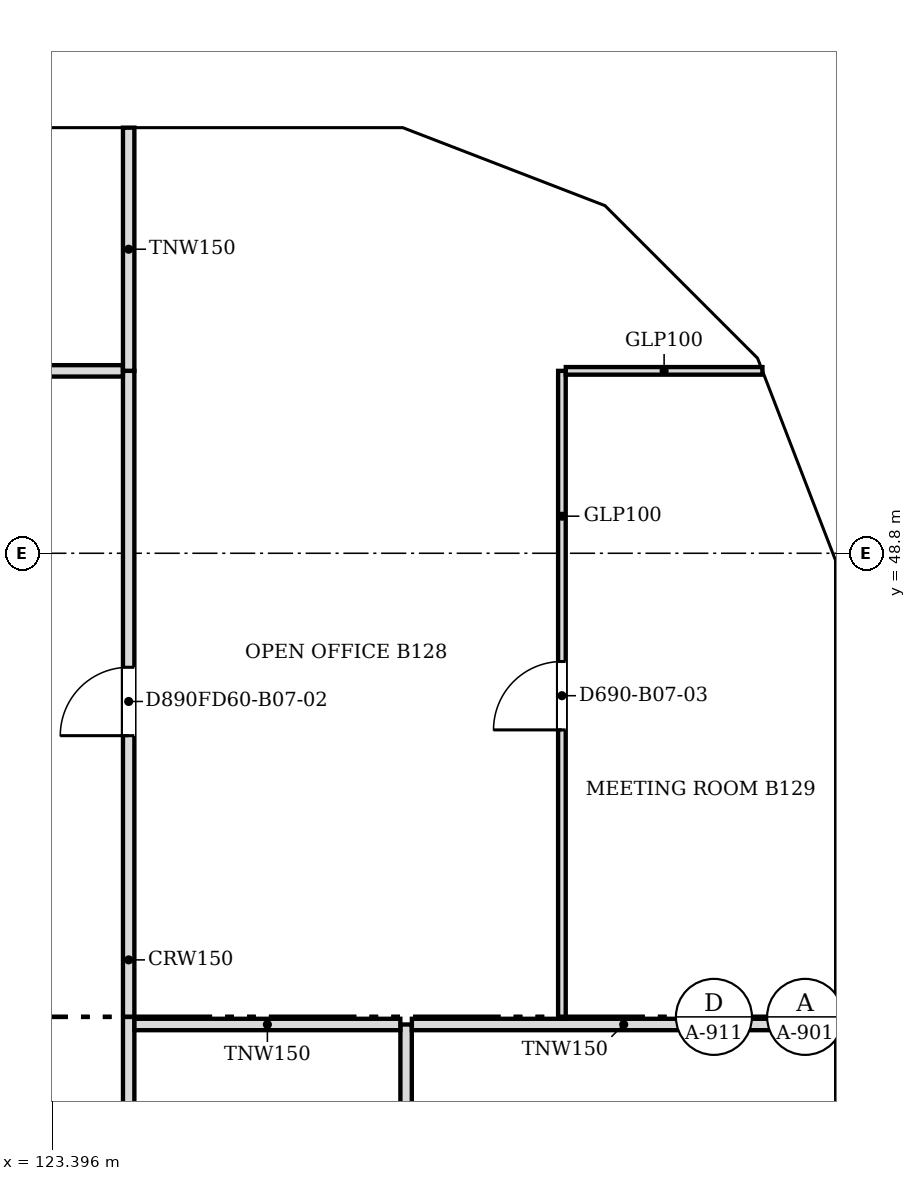
"""IFC4 building model, lengths in metres.
Left out: names, types, materials, properties, quantities, classifications, styles, units other than length and angle.
Written with IfcOpenShell. Run it as: python <this file> out.ifc"""

import sys

from ifc_helpers import new_model, si_unit, direction, frame, frame_2d, origin, place, context, subcontext, project, spatial, polyline, rectangle, outline, extrude, faceted_brep, source, transform, mapped, element, fill, save


model = new_model("IFC4")
c1 = context("Model", 3, precision=1e-05, world=origin(), true_north=direction((0.0, 1.0)))
c2 = subcontext(c1, "Body", "Model", "MODEL_VIEW")
j1 = project(units=[si_unit("LENGTHUNIT", "METRE"), si_unit("PLANEANGLEUNIT", "RADIAN")], contexts=[c1])
p1 = place(None, origin())
s1 = spatial("IfcSite", under=j1, at=p1, CompositionType="ELEMENT")
p2 = place(p1, origin())
s2 = spatial("IfcBuilding", under=s1, at=p2, CompositionType="ELEMENT")
p3 = place(p2, frame((0.0, 0.0, 72.4)))
s3 = spatial("IfcBuildingStorey", under=s2, at=p3, CompositionType="ELEMENT", Elevation=72.4)
m1 = source(origin(), c2, "Body", "SweptSolid", [
    extrude(outline(polyline([(3.05, 0.0), (6.1, 3.8), (3.05, 7.6), (0.0, 3.8), (3.05, 0.0)])), frame((0.0, 0.25, 0.0), z_axis=(0.0, -1.0, 0.0), x_axis=(1.0, 0.0, 0.0)), (0.0, 0.0, 1.0), 0.5),
])
p4 = place(p3, frame((133.95, 39.65, -3.8), z_axis=(0.0, 0.0, 1.0), x_axis=(0.0, 1.0, 0.0)))
e1 = element("IfcWall", 1, at=p4, inside=s3, PredefinedType="SOLIDWALL", context=c2, shape_type="MappedRepresentation", body=[
    mapped(m1, transform((0.0, 0.0, 0.0), scale=1.0)),
])
m2 = source(origin(), c2, "Body", "SweptSolid", [
    extrude(outline(polyline([(3.05, 0.399), (5.78, 3.8), (3.05, 7.2), (0.321, 3.8), (3.05, 0.399)])), frame((0.0, 0.26, 0.0), z_axis=(0.0, -1.0, 0.0), x_axis=(1.0, 0.0, 0.0)), (0.0, 0.0, 1.0), 0.52),
])
p5 = place(p4, origin())
e2 = element("IfcOpeningElement", 2, at=p5, cuts=e1, PredefinedType="OPENING", context=c2, shape_type="MappedRepresentation", body=[
    mapped(m2, transform((0.0, 0.0, 0.0), scale=1.0)),
])
m3 = source(origin(), c2, "Body", "Brep", [
    faceted_brep([(3.003, -0.25, 0.0), (3.05, -0.25, 0.06), (3.05, -0.25, 7.54), (3.003, -0.25, 7.6), (0.0, -0.25, 3.8), (0.0, 0.25, 3.8), (2.957, 0.25, 7.541), (2.957, 0.25, 0.059), (3.003, 0.0, 0.0), (3.003, 0.0, 7.6)], [[[0, 1, 2, 3, 4]], [[5, 6, 7]], [[1, 0, 8]], [[9, 3, 2]], [[6, 5, 4, 3, 9]], [[5, 7, 8, 0, 4]], [[1, 8, 7, 6, 9, 2]]]),
])
p6 = place(p3, frame((133.95, 45.75, -3.8), z_axis=(0.0, 0.0, 1.0), x_axis=(0.0, 1.0, 0.0)))
e3 = element("IfcWall", 3, at=p6, inside=s3, PredefinedType="SOLIDWALL", context=c2, shape_type="MappedRepresentation", body=[
    mapped(m3, transform((0.0, 0.0, 0.0), scale=1.0)),
])
m4 = source(origin(), c2, "Body", "SweptSolid", [
    extrude(outline(polyline([(2.803, 6.944), (0.319, 3.8), (2.803, 0.656), (2.803, 6.944)])), frame((0.0, 0.26, 0.0), z_axis=(0.0, -1.0, 0.0), x_axis=(1.0, 0.0, 0.0)), (0.0, 0.0, 1.0), 0.52),
])
p7 = place(p6, origin())
e4 = element("IfcOpeningElement", 4, at=p7, cuts=e3, PredefinedType="OPENING", context=c2, shape_type="MappedRepresentation", body=[
    mapped(m4, transform((0.0, 0.0, 0.0), scale=1.0)),
])
m5 = source(origin(), c2, "Body", "Brep", [
    faceted_brep([(0.047, -0.25, 0.0), (2.997, -0.25, 3.8), (0.047, -0.25, 7.6), (0.0, -0.25, 7.541), (0.0, -0.25, 0.059), (0.093, 0.25, 7.54), (2.944, 0.25, 3.868), (2.944, 0.25, 3.732), (0.093, 0.25, 0.06), (2.997, 0.0, 3.8), (0.047, 0.0, 0.0), (0.047, 0.0, 7.6)], [[[0, 1, 2, 3, 4]], [[5, 6, 7, 8]], [[8, 7, 9, 1, 0, 10]], [[6, 5, 11, 2, 1, 9]], [[3, 2, 11]], [[10, 0, 4]], [[8, 10, 4, 3, 11, 5]], [[9, 7, 6]]]),
])
p8 = place(p3, frame((133.967, 48.71, -3.8), z_axis=(0.0, 0.0, 1.0), x_axis=(-0.359901446078, 0.932990326376, 0.0)))
e5 = element("IfcWall", 5, at=p8, inside=s3, PredefinedType="SOLIDWALL", context=c2, shape_type="MappedRepresentation", body=[
    mapped(m5, transform((0.0, 0.0, 0.0), scale=1.0)),
])
m6 = source(origin(), c2, "Body", "SweptSolid", [
    extrude(outline(polyline([(0.247, 0.665), (2.681, 3.8), (0.247, 6.935), (0.247, 0.665)])), frame((0.0, 0.26, 0.0), z_axis=(0.0, -1.0, 0.0), x_axis=(1.0, 0.0, 0.0)), (0.0, 0.0, 1.0), 0.52),
])
p9 = place(p8, origin())
e6 = element("IfcOpeningElement", 6, at=p9, cuts=e5, PredefinedType="OPENING", context=c2, shape_type="MappedRepresentation", body=[
    mapped(m6, transform((0.0, 0.0, 0.0), scale=1.0)),
])
m7 = source(origin(), c2, "Body", "Brep", [
    faceted_brep([(2.944, -0.25, 0.0), (2.997, -0.25, 0.068), (2.997, -0.25, 7.532), (2.944, -0.25, 7.6), (0.0, -0.25, 3.8), (0.053, 0.25, 3.868), (2.891, 0.25, 7.532), (2.891, 0.25, 0.068), (0.053, 0.25, 3.731), (2.944, 0.0, 0.0), (2.944, 0.0, 7.6), (0.0, 0.0, 3.8)], [[[0, 1, 2, 3, 4]], [[5, 6, 7, 8]], [[1, 0, 9]], [[10, 3, 2]], [[6, 5, 11, 4, 3, 10]], [[8, 7, 9, 0, 4, 11]], [[8, 11, 5]], [[1, 9, 7, 6, 10, 2]]]),
])
p10 = place(p3, frame((132.888, 51.506, -3.8), z_axis=(0.0, 0.0, 1.0), x_axis=(-0.707147509625, 0.707066050402, 0.0)))
e7 = element("IfcWall", 7, at=p10, inside=s3, PredefinedType="SOLIDWALL", context=c2, shape_type="MappedRepresentation", body=[
    mapped(m7, transform((0.0, 0.0, 0.0), scale=1.0)),
])
m8 = source(origin(), c2, "Body", "SweptSolid", [
    extrude(outline(polyline([(2.744, 6.934), (0.316, 3.8), (2.744, 0.666), (2.744, 6.934)])), frame((0.0, 0.26, 0.0), z_axis=(0.0, -1.0, 0.0), x_axis=(1.0, 0.0, 0.0)), (0.0, 0.0, 1.0), 0.52),
])
p11 = place(p10, origin())
e8 = element("IfcOpeningElement", 8, at=p11, cuts=e7, PredefinedType="OPENING", context=c2, shape_type="MappedRepresentation", body=[
    mapped(m8, transform((0.0, 0.0, 0.0), scale=1.0)),
])
m9 = source(origin(), c2, "Body", "Brep", [
    faceted_brep([(0.053, -0.25, 0.0), (3.003, -0.25, 3.8), (0.053, -0.25, 7.6), (0.0, -0.25, 7.531), (0.0, -0.25, 0.068), (0.106, 0.25, 7.532), (2.957, 0.25, 3.86), (2.957, 0.25, 3.74), (0.106, 0.25, 0.068), (3.003, 0.0, 3.8), (0.053, 0.0, 0.0), (0.053, 0.0, 7.6)], [[[0, 1, 2, 3, 4]], [[5, 6, 7, 8]], [[8, 7, 9, 1, 0, 10]], [[6, 5, 11, 2, 1, 9]], [[3, 2, 11]], [[10, 0, 4]], [[8, 10, 4, 3, 11, 5]], [[9, 7, 6]]]),
])
p12 = place(p3, frame((130.856, 53.569, -3.8), z_axis=(0.0, 0.0, 1.0), x_axis=(-0.933007896601, 0.359855894603, 0.0)))
e9 = element("IfcWall", 9, at=p12, inside=s3, PredefinedType="SOLIDWALL", context=c2, shape_type="MappedRepresentation", body=[
    mapped(m9, transform((0.0, 0.0, 0.0), scale=1.0)),
])
m10 = source(origin(), c2, "Body", "SweptSolid", [
    extrude(outline(polyline([(0.253, 0.665), (2.687, 3.8), (0.253, 6.935), (0.253, 0.665)])), frame((0.0, 0.26, 0.0), z_axis=(0.0, -1.0, 0.0), x_axis=(1.0, 0.0, 0.0)), (0.0, 0.0, 1.0), 0.52),
])
p13 = place(p12, origin())
e10 = element("IfcOpeningElement", 10, at=p13, cuts=e9, PredefinedType="OPENING", context=c2, shape_type="MappedRepresentation", body=[
    mapped(m10, transform((0.0, 0.0, 0.0), scale=1.0)),
])
m11 = source(origin(), c2, "Body", "Brep", [
    faceted_brep([(3.003, -0.25, 0.0), (6.053, -0.25, 3.8), (3.003, -0.25, 7.6), (0.0, -0.25, 3.8), (0.047, 0.25, 3.859), (3.003, 0.25, 7.6), (6.053, 0.25, 3.8), (3.003, 0.25, 0.0), (0.047, 0.25, 3.741), (0.0, 0.0, 3.8)], [[[0, 1, 2, 3]], [[4, 5, 6, 7, 8]], [[7, 6, 1, 0]], [[6, 5, 2, 1]], [[5, 4, 9, 3, 2]], [[8, 7, 0, 3, 9]], [[8, 9, 4]]]),
])
p14 = place(p3, frame((128.053, 54.65, -3.8), z_axis=(0.0, 0.0, 1.0), x_axis=(-1.0, 0.0, 0.0)))
e11 = element("IfcWall", 11, at=p14, inside=s3, PredefinedType="SOLIDWALL", context=c2, shape_type="MappedRepresentation", body=[
    mapped(m11, transform((0.0, 0.0, 0.0), scale=1.0)),
])
m12 = source(origin(), c2, "Body", "SweptSolid", [
    extrude(outline(polyline([(3.005, 0.401), (5.733, 3.8), (3.005, 7.199), (0.319, 3.8), (3.005, 0.401)])), frame((0.0, 0.26, 0.0), z_axis=(0.0, -1.0, 0.0), x_axis=(1.0, 0.0, 0.0)), (0.0, 0.0, 1.0), 0.52),
])
p15 = place(p14, origin())
e12 = element("IfcOpeningElement", 12, at=p15, cuts=e11, PredefinedType="OPENING", context=c2, shape_type="MappedRepresentation", body=[
    mapped(m12, transform((0.0, 0.0, 0.0), scale=1.0)),
])
p16 = place(p2, frame((0.0, 0.0, 76.2)))
s4 = spatial("IfcBuildingStorey", under=s2, at=p16, CompositionType="ELEMENT", Elevation=76.2)
m13 = source(origin(), c2, "Body", "Brep", [
    faceted_brep([(3.05, -0.25, 0.0), (6.1, -0.25, 3.8), (6.1, -0.25, 3.8), (3.05, -0.25, 7.6), (0.0, -0.25, 3.8), (0.0, 0.25, 3.8), (3.05, 0.25, 7.6), (6.1, 0.25, 3.8), (6.1, 0.25, 3.8), (3.05, 0.25, 0.0)], [[[0, 1, 2, 3, 4]], [[5, 6, 7, 8, 9]], [[9, 8, 1, 0]], [[7, 6, 3, 2]], [[6, 5, 4, 3]], [[5, 9, 0, 4]], [[1, 8, 7, 2]]]),
])
p17 = place(p16, frame((133.95, 36.6, -3.8), z_axis=(0.0, 0.0, 1.0), x_axis=(0.0, 1.0, 0.0)))
e13 = element("IfcWall", 13, at=p17, inside=s4, PredefinedType="SOLIDWALL", context=c2, shape_type="MappedRepresentation", body=[
    mapped(m13, transform((0.0, 0.0, 0.0), scale=1.0)),
])
m14 = source(origin(), c2, "Body", "SweptSolid", [
    extrude(outline(polyline([(3.05, 0.399), (5.78, 3.8), (3.05, 7.201), (0.321, 3.8), (3.05, 0.399)])), frame((0.0, 0.26, 0.0), z_axis=(0.0, -1.0, 0.0), x_axis=(1.0, 0.0, 0.0)), (0.0, 0.0, 1.0), 0.52),
])
p18 = place(p17, origin())
e14 = element("IfcOpeningElement", 14, at=p18, cuts=e13, PredefinedType="OPENING", context=c2, shape_type="MappedRepresentation", body=[
    mapped(m14, transform((0.0, 0.0, 0.0), scale=1.0)),
])
m15 = source(origin(), c2, "Body", "Brep", [
    faceted_brep([(3.05, -0.25, 0.0), (6.053, -0.25, 3.8), (3.05, -0.25, 7.6), (0.0, -0.25, 3.8), (0.0, 0.25, 3.8), (3.05, 0.25, 7.6), (6.007, 0.25, 3.859), (6.007, 0.25, 3.741), (3.05, 0.25, 0.0), (6.053, 0.0, 3.8)], [[[0, 1, 2, 3]], [[4, 5, 6, 7, 8]], [[8, 7, 9, 1, 0]], [[6, 5, 2, 1, 9]], [[5, 4, 3, 2]], [[4, 8, 0, 3]], [[9, 7, 6]]]),
])
p19 = place(p16, frame((133.95, 42.7, -3.8), z_axis=(0.0, 0.0, 1.0), x_axis=(0.0, 1.0, 0.0)))
e15 = element("IfcWall", 15, at=p19, inside=s4, PredefinedType="SOLIDWALL", context=c2, shape_type="MappedRepresentation", body=[
    mapped(m15, transform((0.0, 0.0, 0.0), scale=1.0)),
])
m16 = source(origin(), c2, "Body", "SweptSolid", [
    extrude(outline(polyline([(3.049, 0.401), (5.735, 3.8), (3.049, 7.199), (0.321, 3.8), (3.049, 0.401)])), frame((0.0, 0.26, 0.0), z_axis=(0.0, -1.0, 0.0), x_axis=(1.0, 0.0, 0.0)), (0.0, 0.0, 1.0), 0.52),
])
p20 = place(p19, origin())
e16 = element("IfcOpeningElement", 16, at=p20, cuts=e15, PredefinedType="OPENING", context=c2, shape_type="MappedRepresentation", body=[
    mapped(m16, transform((0.0, 0.0, 0.0), scale=1.0)),
])
m17 = source(origin(), c2, "Body", "Brep", [
    faceted_brep([(2.95, -0.25, 0.0), (3.003, -0.25, 0.068), (3.003, -0.25, 7.532), (2.95, -0.25, 7.6), (0.0, -0.25, 3.8), (0.047, 0.25, 3.86), (2.898, 0.25, 7.532), (2.898, 0.25, 0.068), (0.047, 0.25, 3.74), (2.95, 0.0, 0.0), (2.95, 0.0, 7.6), (0.0, 0.0, 3.8)], [[[0, 1, 2, 3, 4]], [[5, 6, 7, 8]], [[1, 0, 9]], [[10, 3, 2]], [[6, 5, 11, 4, 3, 10]], [[8, 7, 9, 0, 4, 11]], [[8, 11, 5]], [[1, 9, 7, 6, 10, 2]]]),
])
p21 = place(p16, frame((133.95, 48.753, -3.8), z_axis=(0.0, 0.0, 1.0), x_axis=(-0.359855894603, 0.933007896601, 0.0)))
e17 = element("IfcWall", 17, at=p21, inside=s4, PredefinedType="SOLIDWALL", context=c2, shape_type="MappedRepresentation", body=[
    mapped(m17, transform((0.0, 0.0, 0.0), scale=1.0)),
])
m18 = source(origin(), c2, "Body", "SweptSolid", [
    extrude(outline(polyline([(2.75, 6.935), (0.316, 3.8), (2.75, 0.665), (2.75, 6.935)])), frame((0.0, 0.26, 0.0), z_axis=(0.0, -1.0, 0.0), x_axis=(1.0, 0.0, 0.0)), (0.0, 0.0, 1.0), 0.52),
])
p22 = place(p21, origin())
e18 = element("IfcOpeningElement", 18, at=p22, cuts=e17, PredefinedType="OPENING", context=c2, shape_type="MappedRepresentation", body=[
    mapped(m18, transform((0.0, 0.0, 0.0), scale=1.0)),
])
m19 = source(origin(), c2, "Body", "Brep", [
    faceted_brep([(0.053, -0.25, 0.0), (2.997, -0.25, 3.8), (0.053, -0.25, 7.6), (0.0, -0.25, 7.532), (0.0, -0.25, 0.068), (0.106, 0.25, 7.532), (2.944, 0.25, 3.868), (2.944, 0.25, 3.732), (0.106, 0.25, 0.068), (2.997, 0.0, 3.8), (0.053, 0.0, 0.0), (0.053, 0.0, 7.6)], [[[0, 1, 2, 3, 4]], [[5, 6, 7, 8]], [[8, 7, 9, 1, 0, 10]], [[6, 5, 11, 2, 1, 9]], [[3, 2, 11]], [[10, 0, 4]], [[8, 10, 4, 3, 11, 5]], [[9, 7, 6]]]),
])
p23 = place(p16, frame((132.926, 51.469, -3.8), z_axis=(0.0, 0.0, 1.0), x_axis=(-0.707066050402, 0.707147509625, 0.0)))
e19 = element("IfcWall", 19, at=p23, inside=s4, PredefinedType="SOLIDWALL", context=c2, shape_type="MappedRepresentation", body=[
    mapped(m19, transform((0.0, 0.0, 0.0), scale=1.0)),
])
m20 = source(origin(), c2, "Body", "SweptSolid", [
    extrude(outline(polyline([(0.253, 0.667), (2.681, 3.8), (0.253, 6.934), (0.253, 0.667)])), frame((0.0, 0.26, 0.0), z_axis=(0.0, -1.0, 0.0), x_axis=(1.0, 0.0, 0.0)), (0.0, 0.0, 1.0), 0.52),
])
p24 = place(p23, origin())
e20 = element("IfcOpeningElement", 20, at=p24, cuts=e19, PredefinedType="OPENING", context=c2, shape_type="MappedRepresentation", body=[
    mapped(m20, transform((0.0, 0.0, 0.0), scale=1.0)),
])
m21 = source(origin(), c2, "Body", "Brep", [
    faceted_brep([(2.95, -0.25, 0.0), (2.997, -0.25, 0.059), (2.997, -0.25, 7.541), (2.95, -0.25, 7.6), (0.0, -0.25, 3.8), (0.053, 0.25, 3.868), (2.904, 0.25, 7.54), (2.904, 0.25, 0.06), (0.053, 0.25, 3.732), (2.95, 0.0, 0.0), (2.95, 0.0, 7.6), (0.0, 0.0, 3.8)], [[[0, 1, 2, 3, 4]], [[5, 6, 7, 8]], [[1, 0, 9]], [[10, 3, 2]], [[6, 5, 11, 4, 3, 10]], [[8, 7, 9, 0, 4, 11]], [[8, 11, 5]], [[1, 9, 7, 6, 10, 2]]]),
])
p25 = place(p16, frame((130.806, 53.588, -3.8), z_axis=(0.0, 0.0, 1.0), x_axis=(-0.932990326376, 0.359901446078, 0.0)))
e21 = element("IfcWall", 21, at=p25, inside=s4, PredefinedType="SOLIDWALL", context=c2, shape_type="MappedRepresentation", body=[
    mapped(m21, transform((0.0, 0.0, 0.0), scale=1.0)),
])
p26 = place(p25, origin())
e22 = element("IfcOpeningElement", 22, at=p26, cuts=e21, PredefinedType="OPENING", context=c2, shape_type="MappedRepresentation", body=[
    mapped(m18, transform((0.0, 0.0, 0.0), scale=1.0)),
])
m22 = source(origin(), c2, "Body", "Brep", [
    faceted_brep([(0.047, -0.25, 0.0), (3.05, -0.25, 3.8), (0.047, -0.25, 7.6), (0.0, -0.25, 7.54), (0.0, -0.25, 0.06), (0.093, 0.25, 7.541), (3.05, 0.25, 3.8), (0.093, 0.25, 0.059), (0.047, 0.0, 0.0), (0.047, 0.0, 7.6)], [[[0, 1, 2, 3, 4]], [[5, 6, 7]], [[7, 6, 1, 0, 8]], [[6, 5, 9, 2, 1]], [[3, 2, 9]], [[8, 0, 4]], [[7, 8, 4, 3, 9, 5]]]),
])
p27 = place(p16, frame((128.1, 54.65, -3.8), z_axis=(0.0, 0.0, 1.0), x_axis=(-1.0, 0.0, 0.0)))
e23 = element("IfcWall", 23, at=p27, inside=s4, PredefinedType="SOLIDWALL", context=c2, shape_type="MappedRepresentation", body=[
    mapped(m22, transform((0.0, 0.0, 0.0), scale=1.0)),
])
m23 = source(origin(), c2, "Body", "SweptSolid", [
    extrude(outline(polyline([(0.247, 0.656), (2.731, 3.8), (0.247, 6.944), (0.247, 0.656)])), frame((0.0, 0.26, 0.0), z_axis=(0.0, -1.0, 0.0), x_axis=(1.0, 0.0, 0.0)), (0.0, 0.0, 1.0), 0.52),
])
p28 = place(p27, origin())
e24 = element("IfcOpeningElement", 24, at=p28, cuts=e23, PredefinedType="OPENING", context=c2, shape_type="MappedRepresentation", body=[
    mapped(m23, transform((0.0, 0.0, 0.0), scale=1.0)),
])
m24 = source(origin(), c2, "Body", "SweptSolid", [
    extrude(outline(polyline([(3.05, 0.0), (6.1, 3.8), (3.05, 7.6), (0.0, 3.8), (3.05, 0.0)])), frame((0.0, 0.25, 0.0), z_axis=(0.0, -1.0, 0.0), x_axis=(1.0, 0.0, 0.0)), (0.0, 0.0, 1.0), 0.5),
])
p29 = place(p16, frame((125.05, 54.65, -3.8), z_axis=(0.0, 0.0, 1.0), x_axis=(-1.0, 0.0, 0.0)))
e25 = element("IfcWall", 25, at=p29, inside=s4, PredefinedType="SOLIDWALL", context=c2, shape_type="MappedRepresentation", body=[
    mapped(m24, transform((0.0, 0.0, 0.0), scale=1.0)),
])
p30 = place(p29, origin())
e26 = element("IfcOpeningElement", 26, at=p30, cuts=e25, PredefinedType="OPENING", context=c2, shape_type="MappedRepresentation", body=[
    mapped(m14, transform((0.0, 0.0, 0.0), scale=1.0)),
])
p31 = place(p3, frame((124.4, 51.2, 0.0), z_axis=(0.0, 0.0, 1.0), x_axis=(0.0, -1.0, 0.0)))
e27 = element("IfcWall", 27, at=p31, inside=s3, PredefinedType="PARTITIONING", context=c2, shape_type="SweptSolid", body=[
    extrude(rectangle(XDim=14.6, YDim=0.15, at=frame_2d((7.3, 0.0))), origin(), (0.0, 0.0, 1.0), 3.067),
])
m25 = source(origin(), c2, "Body", "SweptSolid", [
    extrude(rectangle(XDim=0.9, YDim=2.1, at=frame_2d((0.45, 1.05))), frame((0.0, 0.085, 0.0), z_axis=(0.0, -1.0, 0.0), x_axis=(1.0, 0.0, 0.0)), (0.0, 0.0, 1.0), 0.17),
])
p32 = place(p31, frame((3.9, 0.0, 0.0)))
e28 = element("IfcOpeningElement", 28, at=p32, cuts=e27, PredefinedType="OPENING", context=c2, shape_type="MappedRepresentation", body=[
    mapped(m25, transform((0.0, 0.0, 0.0), scale=1.0)),
])
m26 = source(origin(), c2, "Body", "SweptSolid", [
    extrude(rectangle(XDim=1.8, YDim=2.1, at=frame_2d((0.9, 1.05))), frame((0.0, 0.085, 0.0), z_axis=(0.0, -1.0, 0.0), x_axis=(1.0, 0.0, 0.0)), (0.0, 0.0, 1.0), 0.17),
])
p33 = place(p31, frame((10.7, 0.0, 0.0)))
e29 = element("IfcOpeningElement", 29, at=p33, cuts=e27, PredefinedType="OPENING", context=c2, shape_type="MappedRepresentation", body=[
    mapped(m26, transform((0.0, 0.0, 0.0), scale=1.0)),
])
p34 = place(p3, frame((128.05, 42.6, 0.0), z_axis=(0.0, 0.0, 1.0), x_axis=(0.0, -1.0, 0.0)))
e30 = element("IfcWall", 30, at=p34, inside=s3, PredefinedType="PARTITIONING", context=c2, shape_type="SweptSolid", body=[
    extrude(rectangle(XDim=5.924, YDim=0.15, at=frame_2d((2.962, 0.0))), origin(), (0.0, 0.0, 1.0), 3.067),
])
p35 = place(p34, frame((2.024, 0.0, 0.0)))
e31 = element("IfcOpeningElement", 31, at=p35, cuts=e30, PredefinedType="OPENING", context=c2, shape_type="MappedRepresentation", body=[
    mapped(m26, transform((0.0, 0.0, 0.0), scale=1.0)),
])
p36 = place(p3, frame((124.476, 42.6, 0.0), z_axis=(0.0, 0.0, 1.0), x_axis=(1.0, 0.0, 0.0)))
e32 = element("IfcWall", 32, at=p36, inside=s3, PredefinedType="PARTITIONING", context=c2, shape_type="SweptSolid", body=[
    extrude(rectangle(XDim=3.498, YDim=0.15, at=frame_2d((1.749, 0.0))), origin(), (0.0, 0.0, 1.0), 3.067),
])
p37 = place(p3, frame((128.126, 42.6, 0.0), z_axis=(0.0, 0.0, 1.0), x_axis=(1.0, 0.0, 0.0)))
e33 = element("IfcWall", 33, at=p37, inside=s3, PredefinedType="PARTITIONING", context=c2, shape_type="SweptSolid", body=[
    extrude(rectangle(XDim=5.574, YDim=0.15, at=frame_2d((2.787, 0.0))), origin(), (0.0, 0.0, 1.0), 3.067),
])
p38 = place(p3, frame((130.1, 51.2, 0.0), z_axis=(0.0, 0.0, 1.0), x_axis=(0.0, -1.0, 0.0)))
e34 = element("IfcWall", 34, at=p38, inside=s3, PredefinedType="PARTITIONING", context=c2, shape_type="SweptSolid", body=[
    extrude(rectangle(XDim=8.524, YDim=0.1, at=frame_2d((4.262, 0.0))), origin(), (0.0, 0.0, 1.0), 3.067),
])
m27 = source(origin(), c2, "Body", "SweptSolid", [
    extrude(rectangle(XDim=0.9, YDim=2.1, at=frame_2d((0.45, 1.05))), frame((0.0, 0.06, 0.0), z_axis=(0.0, -1.0, 0.0), x_axis=(1.0, 0.0, 0.0)), (0.0, 0.0, 1.0), 0.12),
])
p39 = place(p38, frame((3.824, 0.0, 0.0)))
e35 = element("IfcOpeningElement", 35, at=p39, cuts=e34, PredefinedType="OPENING", context=c2, shape_type="MappedRepresentation", body=[
    mapped(m27, transform((0.0, 0.0, 0.0), scale=1.0)),
])
p40 = place(p3, frame((108.5, 51.2, 0.0), z_axis=(0.0, 0.0, 1.0), x_axis=(1.0, 0.0, 0.0)))
e36 = element("IfcWall", 36, at=p40, inside=s3, PredefinedType="PARTITIONING", context=c2, shape_type="SweptSolid", body=[
    extrude(rectangle(XDim=15.824, YDim=0.15, at=frame_2d((7.912, 0.0))), origin(), (0.0, 0.0, 1.0), 3.067),
])
m28 = source(origin(), c2, "Body", "SweptSolid", [
    extrude(rectangle(XDim=1.0, YDim=2.1, at=frame_2d((0.5, 1.05))), frame((0.0, 0.085, 0.0), z_axis=(0.0, -1.0, 0.0), x_axis=(1.0, 0.0, 0.0)), (0.0, 0.0, 1.0), 0.17),
])
p41 = place(p40, frame((11.451, 0.0, 0.0)))
e37 = element("IfcOpeningElement", 37, at=p41, cuts=e36, PredefinedType="OPENING", context=c2, shape_type="MappedRepresentation", body=[
    mapped(m28, transform((0.0, 0.0, 0.0), scale=1.0)),
])
p42 = place(p40, frame((3.5, 0.0, 0.0)))
e38 = element("IfcOpeningElement", 38, at=p42, cuts=e36, PredefinedType="OPENING", context=c2, shape_type="MappedRepresentation", body=[
    mapped(m28, transform((0.0, 0.0, 0.0), scale=1.0)),
])
p43 = place(p3, frame((124.4, 51.201, 0.0), z_axis=(0.0, 0.0, 1.0), x_axis=(0.0, 1.0, 0.0)))
e39 = element("IfcWall", 39, at=p43, inside=s3, PredefinedType="PARTITIONING", context=c2, shape_type="SweptSolid", body=[
    extrude(rectangle(XDim=3.199, YDim=0.15, at=frame_2d((1.6, 0.0))), origin(), (0.0, 0.0, 1.0), 3.067),
])
p44 = place(p3, frame((130.151, 51.2, 0.0), z_axis=(0.0, 0.0, 1.0), x_axis=(1.0, 0.0, 0.0)))
e40 = element("IfcWall", 40, at=p44, inside=s3, PredefinedType="PARTITIONING", context=c2, shape_type="SweptSolid", body=[
    extrude(rectangle(XDim=2.587, YDim=0.1, at=frame_2d((1.294, 0.0))), origin(), (0.0, 0.0, 1.0), 3.067),
])
m29 = source(origin(), c2, "Body", "SweptSolid", [
    extrude(rectangle(XDim=0.9, YDim=2.1, at=frame_2d((0.45, 1.05))), frame((0.0, 0.025, 0.0), z_axis=(0.0, -1.0, 0.0), x_axis=(1.0, 0.0, 0.0)), (0.0, 0.0, 1.0), 0.05),
])
p45 = place(p32, origin())
e41 = element("IfcDoor", 41, at=p45, inside=s3, OperationType="SINGLE_SWING_RIGHT", PredefinedType="DOOR", context=c2, shape_type="MappedRepresentation", body=[
    mapped(m29, transform((0.0, 0.0, 0.0), scale=1.0)),
])
fill(e28, e41)
p46 = place(p39, origin())
e42 = element("IfcDoor", 42, at=p46, inside=s3, OperationType="SINGLE_SWING_RIGHT", PredefinedType="DOOR", context=c2, shape_type="MappedRepresentation", body=[
    mapped(m29, transform((0.0, 0.0, 0.0), scale=1.0)),
])
fill(e35, e42)
save(model, sys.argv[1])
